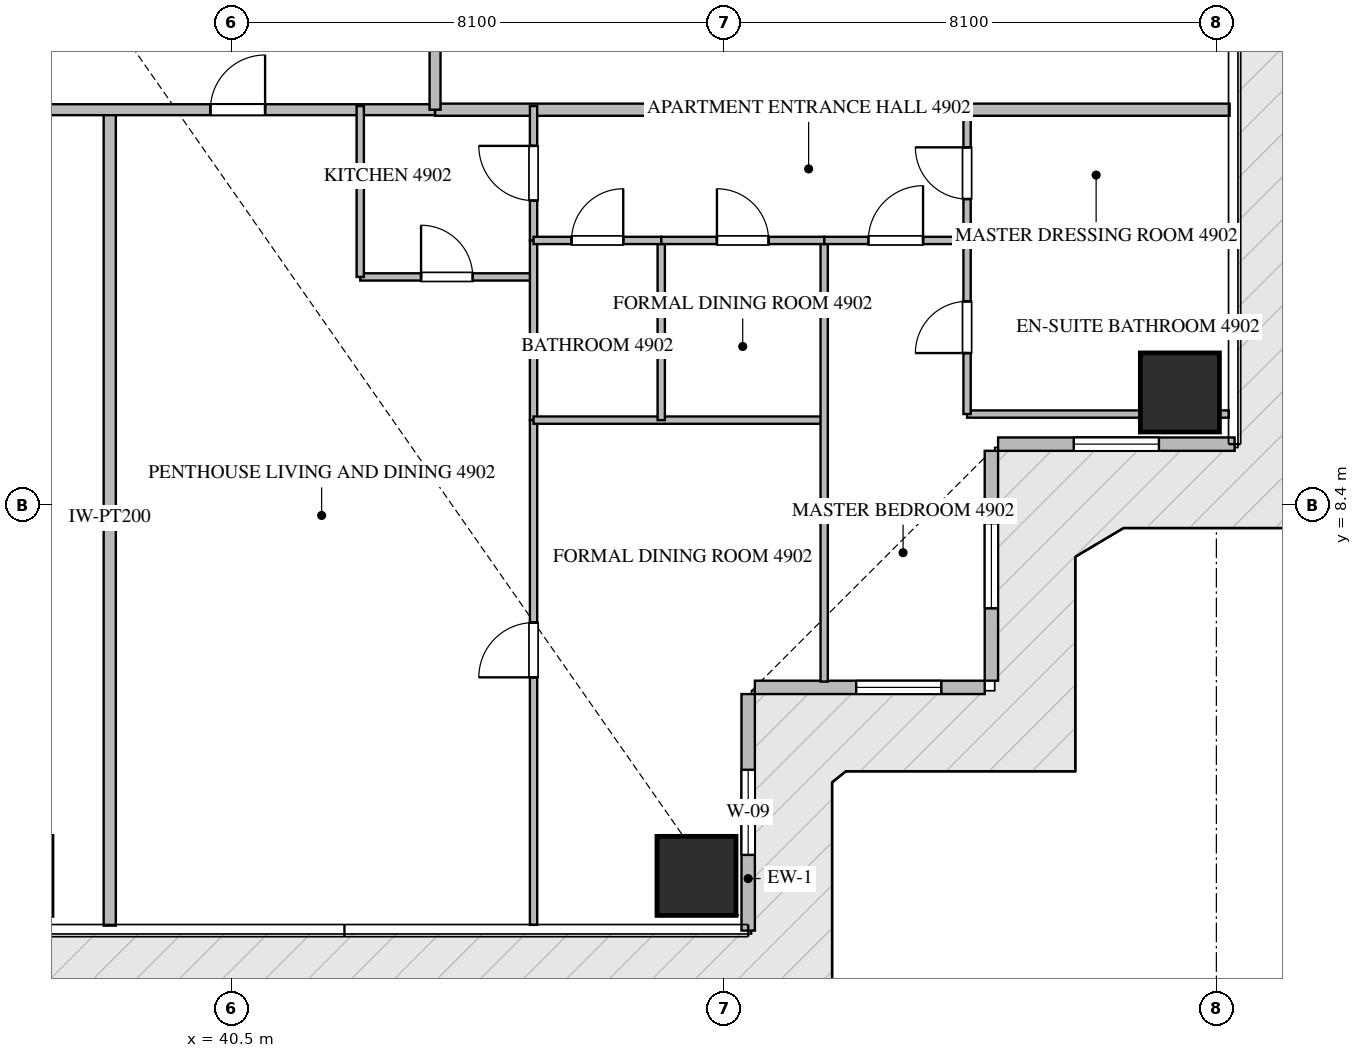
"""IFC4 building model, lengths in metres.
Left out: names, types, materials, properties, quantities, classifications, styles, units other than length and angle.
Written with IfcOpenShell. Run it as: python <this file> out.ifc"""

import sys

from ifc_helpers import new_model, si_unit, direction, frame, frame_2d, origin, origin_2d, place, context, subcontext, project, spatial, rectangle, extrude, source, transform, mapped, element, fill, save


model = new_model("IFC4")
c1 = context("Model", 3, precision=1e-05, world=origin(), true_north=direction((0.0, 1.0)))
c2 = subcontext(c1, "Body", "Model", "MODEL_VIEW")
j1 = project(units=[si_unit("LENGTHUNIT", "METRE"), si_unit("PLANEANGLEUNIT", "RADIAN")], contexts=[c1])
p1 = place(None, origin())
s1 = spatial("IfcSite", under=j1, at=p1, CompositionType="ELEMENT")
p2 = place(p1, origin())
s2 = spatial("IfcBuilding", under=s1, at=p2, CompositionType="ELEMENT")
p3 = place(p2, frame((0.0, 0.0, 195.15)))
s3 = spatial("IfcBuildingStorey", under=s2, at=p3, CompositionType="ELEMENT", Elevation=195.15)
m1 = source(origin(), c2, "Body", "SweptSolid", [
    extrude(rectangle(XDim=1.3, YDim=1.3, at=origin_2d()), origin(), (0.0, 0.0, 1.0), 3.57),
])
for number, where, z_axis, x_axis in (
    (1, (48.15, 2.3, -0.26), (0.0, 0.0, 1.0), (1.0, 0.0, 0.0)),
    (2, (56.1, 10.25, -0.26), (0.0, 0.0, 1.0), (1.0, 0.0, 0.0)),
):
    element("IfcColumn", number, at=place(p3, frame(where, z_axis=z_axis, x_axis=x_axis)), inside=s3, PredefinedType="COLUMN", context=c2, shape_type="MappedRepresentation", body=[
        mapped(m1, transform((0.0, 0.0, 0.0), scale=1.0)),
    ])
p4 = place(p3, frame((49.0, 1.4, 0.0), z_axis=(0.0, 0.0, 1.0), x_axis=(0.0, 1.0, 0.0)))
e3 = element("IfcWall", 3, at=p4, inside=s3, PredefinedType="ELEMENTEDWALL", context=c2, shape_type="SweptSolid", body=[
    extrude(rectangle(XDim=3.89, YDim=0.22, at=frame_2d((1.945, 0.0))), origin(), (0.0, 0.0, 1.0), 3.295),
])
p5 = place(p4, frame((1.245, 0.0, 0.65)))
e4 = element("IfcOpeningElement", 4, at=p5, cuts=e3, PredefinedType="OPENING", context=c2, shape_type="SweptSolid", body=[
    extrude(rectangle(XDim=1.4, YDim=1.35, at=frame_2d((0.7, 0.675))), frame((0.0, 0.12, 0.0), z_axis=(0.0, -1.0, 0.0), x_axis=(1.0, 0.0, 0.0)), (0.0, 0.0, 1.0), 0.24),
])
p6 = place(p3, frame((49.11, 5.4, 0.0), z_axis=(0.0, 0.0, 1.0), x_axis=(1.0, 0.0, 0.0)))
e5 = element("IfcWall", 5, at=p6, inside=s3, PredefinedType="ELEMENTEDWALL", context=c2, shape_type="SweptSolid", body=[
    extrude(rectangle(XDim=3.78, YDim=0.22, at=frame_2d((1.89, 0.0))), origin(), (0.0, 0.0, 1.0), 3.295),
])
p7 = place(p6, frame((1.666, 0.0, 0.65)))
e6 = element("IfcOpeningElement", 6, at=p7, cuts=e5, PredefinedType="OPENING", context=c2, shape_type="SweptSolid", body=[
    extrude(rectangle(XDim=1.4, YDim=1.35, at=frame_2d((0.7, 0.675))), frame((0.0, 0.12, 0.0), z_axis=(0.0, -1.0, 0.0), x_axis=(1.0, 0.0, 0.0)), (0.0, 0.0, 1.0), 0.24),
])
p8 = place(p3, frame((53.0, 5.51, 0.0), z_axis=(0.0, 0.0, 1.0), x_axis=(0.0, 1.0, 0.0)))
e7 = element("IfcWall", 7, at=p8, inside=s3, PredefinedType="ELEMENTEDWALL", context=c2, shape_type="SweptSolid", body=[
    extrude(rectangle(XDim=3.78, YDim=0.22, at=frame_2d((1.89, 0.0))), origin(), (0.0, 0.0, 1.0), 3.295),
])
p9 = place(p8, frame((1.19, 0.0, 0.65)))
e8 = element("IfcOpeningElement", 8, at=p9, cuts=e7, PredefinedType="OPENING", context=c2, shape_type="SweptSolid", body=[
    extrude(rectangle(XDim=1.4, YDim=1.35, at=frame_2d((0.7, 0.675))), frame((0.0, 0.12, 0.0), z_axis=(0.0, -1.0, 0.0), x_axis=(1.0, 0.0, 0.0)), (0.0, 0.0, 1.0), 0.24),
])
p10 = place(p3, frame((53.11, 9.4, 0.0), z_axis=(0.0, 0.0, 1.0), x_axis=(1.0, 0.0, 0.0)))
e9 = element("IfcWall", 9, at=p10, inside=s3, PredefinedType="ELEMENTEDWALL", context=c2, shape_type="SweptSolid", body=[
    extrude(rectangle(XDim=3.89, YDim=0.22, at=frame_2d((1.945, 0.0))), origin(), (0.0, 0.0, 1.0), 3.295),
])
p11 = place(p10, frame((1.245, 0.0, 0.65)))
e10 = element("IfcOpeningElement", 10, at=p11, cuts=e9, PredefinedType="OPENING", context=c2, shape_type="SweptSolid", body=[
    extrude(rectangle(XDim=1.4, YDim=1.35, at=frame_2d((0.7, 0.675))), frame((0.0, 0.12, 0.0), z_axis=(0.0, -1.0, 0.0), x_axis=(1.0, 0.0, 0.0)), (0.0, 0.0, 1.0), 0.24),
])
p12 = place(p3, frame((38.5, 1.482, 0.0), z_axis=(0.0, 0.0, 1.0), x_axis=(0.0, 1.0, 0.0)))
e11 = element("IfcWall", 11, at=p12, inside=s3, PredefinedType="PARTITIONING", context=c2, shape_type="SweptSolid", body=[
    extrude(rectangle(XDim=13.418, YDim=0.2, at=frame_2d((6.709, 0.0))), origin(), (0.0, 0.0, 1.0), 3.31),
])
p13 = place(p3, frame((43.85, 14.9, 0.0), z_axis=(0.0, 0.0, 1.0), x_axis=(1.0, 0.0, 0.0)))
e12 = element("IfcWall", 12, at=p13, inside=s3, PredefinedType="PARTITIONING", context=c2, shape_type="SweptSolid", body=[
    extrude(rectangle(XDim=13.068, YDim=0.2, at=frame_2d((6.534, 0.0))), origin(), (0.0, 0.0, 1.0), 3.31),
])
p14 = place(p3, frame((20.952, 14.9, 0.0), z_axis=(0.0, 0.0, 1.0), x_axis=(1.0, 0.0, 0.0)))
e13 = element("IfcWall", 13, at=p14, inside=s3, PredefinedType="PARTITIONING", context=c2, shape_type="SweptSolid", body=[
    extrude(rectangle(XDim=22.896, YDim=0.18, at=frame_2d((11.448, 0.0))), origin(), (0.0, 0.0, 1.0), 2.145),
])
p15 = place(p14, frame((14.231, 0.0, 0.0)))
e14 = element("IfcOpeningElement", 14, at=p15, cuts=e13, PredefinedType="OPENING", context=c2, shape_type="SweptSolid", body=[
    extrude(rectangle(XDim=0.9, YDim=2.1, at=frame_2d((0.45, 1.05))), frame((0.0, 0.1, 0.0), z_axis=(0.0, -1.0, 0.0), x_axis=(1.0, 0.0, 0.0)), (0.0, 0.0, 1.0), 0.2),
])
p16 = place(p14, frame((19.203, 0.0, 0.0)))
e15 = element("IfcOpeningElement", 15, at=p16, cuts=e13, PredefinedType="OPENING", context=c2, shape_type="SweptSolid", body=[
    extrude(rectangle(XDim=0.9, YDim=2.1, at=frame_2d((0.45, 1.05))), frame((0.0, 0.1, 0.0), z_axis=(0.0, -1.0, 0.0), x_axis=(1.0, 0.0, 0.0)), (0.0, 0.0, 1.0), 0.2),
])
p17 = place(p3, frame((43.85, 14.9, 0.0), z_axis=(0.0, 0.0, 1.0), x_axis=(0.0, 1.0, 0.0)))
e16 = element("IfcWall", 16, at=p17, inside=s3, PredefinedType="PARTITIONING", context=c2, shape_type="SweptSolid", body=[
    extrude(rectangle(XDim=18.7, YDim=0.18, at=frame_2d((9.35, 0.0))), origin(), (0.0, 0.0, 1.0), 3.31),
])
p18 = place(p17, frame((1.805, 0.0, 0.0)))
e17 = element("IfcOpeningElement", 17, at=p18, cuts=e16, PredefinedType="OPENING", context=c2, shape_type="SweptSolid", body=[
    extrude(rectangle(XDim=1.0, YDim=2.15, at=frame_2d((0.5, 1.075))), frame((0.0, 0.1, 0.0), z_axis=(0.0, -1.0, 0.0), x_axis=(1.0, 0.0, 0.0)), (0.0, 0.0, 1.0), 0.2),
])
p19 = place(p3, frame((42.62, 12.15, 0.0), z_axis=(0.0, 0.0, 1.0), x_axis=(1.0, 0.0, 0.0)))
e18 = element("IfcWall", 18, at=p19, inside=s3, PredefinedType="PARTITIONING", context=c2, shape_type="SweptSolid", body=[
    extrude(rectangle(XDim=2.85, YDim=0.12, at=frame_2d((1.425, 0.0))), origin(), (0.0, 0.0, 1.0), 3.31),
])
p20 = place(p19, frame((1.0, 0.0, 0.0)))
e19 = element("IfcOpeningElement", 19, at=p20, cuts=e18, PredefinedType="OPENING", context=c2, shape_type="SweptSolid", body=[
    extrude(rectangle(XDim=0.85, YDim=2.1, at=frame_2d((0.425, 1.05))), frame((0.0, 0.07, 0.0), z_axis=(0.0, -1.0, 0.0), x_axis=(1.0, 0.0, 0.0)), (0.0, 0.0, 1.0), 0.14),
])
p21 = place(p3, frame((42.62, 12.15, 0.0), z_axis=(0.0, 0.0, 1.0), x_axis=(0.0, 1.0, 0.0)))
e20 = element("IfcWall", 20, at=p21, inside=s3, PredefinedType="PARTITIONING", context=c2, shape_type="SweptSolid", body=[
    extrude(rectangle(XDim=2.81, YDim=0.12, at=frame_2d((1.405, 0.0))), origin(), (0.0, 0.0, 1.0), 3.31),
])
p22 = place(p3, frame((45.47, 12.75, 0.0), z_axis=(0.0, 0.0, 1.0), x_axis=(0.0, 1.0, 0.0)))
e21 = element("IfcWall", 21, at=p22, inside=s3, PredefinedType="PARTITIONING", context=c2, shape_type="SweptSolid", body=[
    extrude(rectangle(XDim=2.21, YDim=0.12, at=frame_2d((1.105, 0.0))), origin(), (0.0, 0.0, 1.0), 3.31),
])
p23 = place(p22, frame((0.655, 0.0, 0.0)))
e22 = element("IfcOpeningElement", 22, at=p23, cuts=e21, PredefinedType="OPENING", context=c2, shape_type="SweptSolid", body=[
    extrude(rectangle(XDim=0.9, YDim=2.1, at=frame_2d((0.45, 1.05))), frame((0.0, 0.07, 0.0), z_axis=(0.0, -1.0, 0.0), x_axis=(1.0, 0.0, 0.0)), (0.0, 0.0, 1.0), 0.14),
])
p24 = place(p3, frame((45.47, 1.495, 0.0), z_axis=(0.0, 0.0, 1.0), x_axis=(0.0, 1.0, 0.0)))
e23 = element("IfcWall", 23, at=p24, inside=s3, PredefinedType="PARTITIONING", context=c2, shape_type="SweptSolid", body=[
    extrude(rectangle(XDim=8.3, YDim=0.12, at=frame_2d((4.15, 0.0))), origin(), (0.0, 0.0, 1.0), 3.31),
])
p25 = place(p24, frame((4.07, 0.0, 0.0)))
e24 = element("IfcOpeningElement", 24, at=p25, cuts=e23, PredefinedType="OPENING", context=c2, shape_type="SweptSolid", body=[
    extrude(rectangle(XDim=0.9, YDim=2.1, at=frame_2d((0.45, 1.05))), frame((0.0, 0.07, 0.0), z_axis=(0.0, -1.0, 0.0), x_axis=(1.0, 0.0, 0.0)), (0.0, 0.0, 1.0), 0.14),
])
p26 = place(p3, frame((45.47, 9.797, 0.0), z_axis=(0.0, 0.0, 1.0), x_axis=(0.0, 1.0, 0.0)))
e25 = element("IfcWall", 25, at=p26, inside=s3, PredefinedType="PARTITIONING", context=c2, shape_type="SweptSolid", body=[
    extrude(rectangle(XDim=2.951, YDim=0.12, at=frame_2d((1.476, 0.0))), origin(), (0.0, 0.0, 1.0), 3.31),
])
p27 = place(p3, frame((45.47, 9.795, 0.0), z_axis=(0.0, 0.0, 1.0), x_axis=(1.0, 0.0, 0.0)))
e26 = element("IfcWall", 26, at=p27, inside=s3, PredefinedType="PARTITIONING", context=c2, shape_type="SweptSolid", body=[
    extrude(rectangle(XDim=4.78, YDim=0.12, at=frame_2d((2.39, 0.0))), origin(), (0.0, 0.0, 1.0), 2.145),
])
p28 = place(p3, frame((50.25, 5.495, 0.0), z_axis=(0.0, 0.0, 1.0), x_axis=(0.0, 1.0, 0.0)))
e27 = element("IfcWall", 27, at=p28, inside=s3, PredefinedType="PARTITIONING", context=c2, shape_type="SweptSolid", body=[
    extrude(rectangle(XDim=7.255, YDim=0.12, at=frame_2d((3.627, 0.0))), origin(), (0.0, 0.0, 1.0), 3.31),
])
p29 = place(p3, frame((47.57, 9.795, 0.0), z_axis=(0.0, 0.0, 1.0), x_axis=(0.0, 1.0, 0.0)))
e28 = element("IfcWall", 28, at=p29, inside=s3, PredefinedType="PARTITIONING", context=c2, shape_type="SweptSolid", body=[
    extrude(rectangle(XDim=2.955, YDim=0.12, at=frame_2d((1.478, 0.0))), origin(), (0.0, 0.0, 1.0), 2.145),
])
p30 = place(p3, frame((45.47, 12.75, 0.0), z_axis=(0.0, 0.0, 1.0), x_axis=(1.0, 0.0, 0.0)))
e29 = element("IfcWall", 29, at=p30, inside=s3, PredefinedType="PARTITIONING", context=c2, shape_type="SweptSolid", body=[
    extrude(rectangle(XDim=2.1, YDim=0.12, at=frame_2d((1.05, 0.0))), origin(), (0.0, 0.0, 1.0), 2.145),
])
p31 = place(p30, frame((0.625, 0.0, 0.0)))
e30 = element("IfcOpeningElement", 30, at=p31, cuts=e29, PredefinedType="OPENING", context=c2, shape_type="SweptSolid", body=[
    extrude(rectangle(XDim=0.85, YDim=2.1, at=frame_2d((0.425, 1.05))), frame((0.0, 0.07, 0.0), z_axis=(0.0, -1.0, 0.0), x_axis=(1.0, 0.0, 0.0)), (0.0, 0.0, 1.0), 0.14),
])
p32 = place(p3, frame((47.572, 12.75, 0.0), z_axis=(0.0, 0.0, 1.0), x_axis=(1.0, 0.0, 0.0)))
e31 = element("IfcWall", 31, at=p32, inside=s3, PredefinedType="PARTITIONING", context=c2, shape_type="SweptSolid", body=[
    extrude(rectangle(XDim=2.678, YDim=0.12, at=frame_2d((1.339, 0.0))), origin(), (0.0, 0.0, 1.0), 2.145),
])
p33 = place(p32, frame((0.914, 0.0, 0.0)))
e32 = element("IfcOpeningElement", 32, at=p33, cuts=e31, PredefinedType="OPENING", context=c2, shape_type="SweptSolid", body=[
    extrude(rectangle(XDim=0.85, YDim=2.1, at=frame_2d((0.425, 1.05))), frame((0.0, 0.07, 0.0), z_axis=(0.0, -1.0, 0.0), x_axis=(1.0, 0.0, 0.0)), (0.0, 0.0, 1.0), 0.14),
])
p34 = place(p3, frame((50.252, 12.75, 0.0), z_axis=(0.0, 0.0, 1.0), x_axis=(1.0, 0.0, 0.0)))
e33 = element("IfcWall", 33, at=p34, inside=s3, PredefinedType="PARTITIONING", context=c2, shape_type="SweptSolid", body=[
    extrude(rectangle(XDim=2.348, YDim=0.12, at=frame_2d((1.174, 0.0))), origin(), (0.0, 0.0, 1.0), 3.31),
])
p35 = place(p34, frame((0.724, 0.0, 0.0)))
e34 = element("IfcOpeningElement", 34, at=p35, cuts=e33, PredefinedType="OPENING", context=c2, shape_type="SweptSolid", body=[
    extrude(rectangle(XDim=0.9, YDim=2.1, at=frame_2d((0.45, 1.05))), frame((0.0, 0.07, 0.0), z_axis=(0.0, -1.0, 0.0), x_axis=(1.0, 0.0, 0.0)), (0.0, 0.0, 1.0), 0.14),
])
p36 = place(p3, frame((52.6, 9.895, 0.0), z_axis=(0.0, 0.0, 1.0), x_axis=(1.0, 0.0, 0.0)))
e35 = element("IfcWall", 35, at=p36, inside=s3, PredefinedType="PARTITIONING", context=c2, shape_type="SweptSolid", body=[
    extrude(rectangle(XDim=4.305, YDim=0.12, at=frame_2d((2.152, 0.0))), origin(), (0.0, 0.0, 1.0), 2.145),
])
p37 = place(p3, frame((52.602, 12.75, 0.0), z_axis=(0.0, 0.0, 1.0), x_axis=(1.0, 0.0, 0.0)))
e36 = element("IfcWall", 36, at=p37, inside=s3, PredefinedType="PARTITIONING", context=c2, shape_type="SweptSolid", body=[
    extrude(rectangle(XDim=4.303, YDim=0.12, at=frame_2d((2.151, 0.0))), origin(), (0.0, 0.0, 1.0), 3.31),
])
p38 = place(p3, frame((52.6, 9.895, 0.0), z_axis=(0.0, 0.0, 1.0), x_axis=(0.0, 1.0, 0.0)))
e37 = element("IfcWall", 37, at=p38, inside=s3, PredefinedType="PARTITIONING", context=c2, shape_type="SweptSolid", body=[
    extrude(rectangle(XDim=2.855, YDim=0.12, at=frame_2d((1.427, 0.0))), origin(), (0.0, 0.0, 1.0), 3.31),
])
p39 = place(p38, frame((1.003, 0.0, 0.0)))
e38 = element("IfcOpeningElement", 38, at=p39, cuts=e37, PredefinedType="OPENING", context=c2, shape_type="SweptSolid", body=[
    extrude(rectangle(XDim=0.85, YDim=2.1, at=frame_2d((0.425, 1.05))), frame((0.0, 0.07, 0.0), z_axis=(0.0, -1.0, 0.0), x_axis=(1.0, 0.0, 0.0)), (0.0, 0.0, 1.0), 0.14),
])
p40 = place(p3, frame((52.6, 12.752, 0.0), z_axis=(0.0, 0.0, 1.0), x_axis=(0.0, 1.0, 0.0)))
e39 = element("IfcWall", 39, at=p40, inside=s3, PredefinedType="PARTITIONING", context=c2, shape_type="SweptSolid", body=[
    extrude(rectangle(XDim=2.208, YDim=0.12, at=frame_2d((1.104, 0.0))), origin(), (0.0, 0.0, 1.0), 3.31),
])
p41 = place(p40, frame((0.679, 0.0, 0.0)))
e40 = element("IfcOpeningElement", 40, at=p41, cuts=e39, PredefinedType="OPENING", context=c2, shape_type="SweptSolid", body=[
    extrude(rectangle(XDim=0.85, YDim=2.1, at=frame_2d((0.425, 1.05))), frame((0.0, 0.07, 0.0), z_axis=(0.0, -1.0, 0.0), x_axis=(1.0, 0.0, 0.0)), (0.0, 0.0, 1.0), 0.14),
])
m2 = source(origin(), c2, "Body", "SweptSolid", [
    extrude(rectangle(XDim=1.4, YDim=1.35, at=frame_2d((0.7, 0.675))), frame((0.0, 0.03, 0.0), z_axis=(0.0, -1.0, 0.0), x_axis=(1.0, 0.0, 0.0)), (0.0, 0.0, 1.0), 0.06),
])
p42 = place(p5, origin())
e41 = element("IfcWindow", 41, at=p42, inside=s3, PartitioningType="SINGLE_PANEL", PredefinedType="WINDOW", context=c2, shape_type="MappedRepresentation", body=[
    mapped(m2, transform((0.0, 0.0, 0.0), scale=1.0)),
])
fill(e4, e41)
p43 = place(p7, origin())
e42 = element("IfcWindow", 42, at=p43, inside=s3, PartitioningType="SINGLE_PANEL", PredefinedType="WINDOW", context=c2, shape_type="MappedRepresentation", body=[
    mapped(m2, transform((0.0, 0.0, 0.0), scale=1.0)),
])
fill(e6, e42)
p44 = place(p9, origin())
e43 = element("IfcWindow", 43, at=p44, inside=s3, PartitioningType="SINGLE_PANEL", PredefinedType="WINDOW", context=c2, shape_type="MappedRepresentation", body=[
    mapped(m2, transform((0.0, 0.0, 0.0), scale=1.0)),
])
fill(e8, e43)
p45 = place(p11, origin())
e44 = element("IfcWindow", 44, at=p45, inside=s3, PartitioningType="SINGLE_PANEL", PredefinedType="WINDOW", context=c2, shape_type="MappedRepresentation", body=[
    mapped(m2, transform((0.0, 0.0, 0.0), scale=1.0)),
])
fill(e10, e44)
m3 = source(origin(), c2, "Body", "SweptSolid", [
    extrude(rectangle(XDim=0.9, YDim=2.1, at=frame_2d((0.45, 1.05))), frame((0.0, 0.025, 0.0), z_axis=(0.0, -1.0, 0.0), x_axis=(1.0, 0.0, 0.0)), (0.0, 0.0, 1.0), 0.05),
])
p46 = place(p16, origin())
e45 = element("IfcDoor", 45, at=p46, inside=s3, OperationType="SINGLE_SWING_RIGHT", PredefinedType="DOOR", context=c2, shape_type="MappedRepresentation", body=[
    mapped(m3, transform((0.0, 0.0, 0.0), scale=1.0)),
])
fill(e15, e45)
m4 = source(origin(), c2, "Body", "SweptSolid", [
    extrude(rectangle(XDim=0.85, YDim=2.1, at=frame_2d((0.425, 1.05))), frame((0.0, 0.025, 0.0), z_axis=(0.0, -1.0, 0.0), x_axis=(1.0, 0.0, 0.0)), (0.0, 0.0, 1.0), 0.05),
])
p47 = place(p20, origin())
e46 = element("IfcDoor", 46, at=p47, inside=s3, OperationType="SINGLE_SWING_LEFT", PredefinedType="DOOR", context=c2, shape_type="MappedRepresentation", body=[
    mapped(m4, transform((0.0, 0.0, 0.0), scale=1.0)),
])
fill(e19, e46)
p48 = place(p23, origin())
e47 = element("IfcDoor", 47, at=p48, inside=s3, OperationType="SINGLE_SWING_RIGHT", PredefinedType="DOOR", context=c2, shape_type="MappedRepresentation", body=[
    mapped(m3, transform((0.0, 0.0, 0.0), scale=1.0)),
])
fill(e22, e47)
p49 = place(p25, origin())
e48 = element("IfcDoor", 48, at=p49, inside=s3, OperationType="SINGLE_SWING_LEFT", PredefinedType="DOOR", context=c2, shape_type="MappedRepresentation", body=[
    mapped(m3, transform((0.0, 0.0, 0.0), scale=1.0)),
])
fill(e24, e48)
p50 = place(p31, origin())
e49 = element("IfcDoor", 49, at=p50, inside=s3, OperationType="SINGLE_SWING_RIGHT", PredefinedType="DOOR", context=c2, shape_type="MappedRepresentation", body=[
    mapped(m4, transform((0.0, 0.0, 0.0), scale=1.0)),
])
fill(e30, e49)
p51 = place(p33, origin())
e50 = element("IfcDoor", 50, at=p51, inside=s3, OperationType="SINGLE_SWING_LEFT", PredefinedType="DOOR", context=c2, shape_type="MappedRepresentation", body=[
    mapped(m4, transform((0.0, 0.0, 0.0), scale=1.0)),
])
fill(e32, e50)
p52 = place(p35, origin())
e51 = element("IfcDoor", 51, at=p52, inside=s3, OperationType="SINGLE_SWING_RIGHT", PredefinedType="DOOR", context=c2, shape_type="MappedRepresentation", body=[
    mapped(m3, transform((0.0, 0.0, 0.0), scale=1.0)),
])
fill(e34, e51)
p53 = place(p39, origin())
e52 = element("IfcDoor", 52, at=p53, inside=s3, OperationType="SINGLE_SWING_LEFT", PredefinedType="DOOR", context=c2, shape_type="MappedRepresentation", body=[
    mapped(m4, transform((0.0, 0.0, 0.0), scale=1.0)),
])
fill(e38, e52)
p54 = place(p41, origin())
e53 = element("IfcDoor", 53, at=p54, inside=s3, OperationType="SINGLE_SWING_RIGHT", PredefinedType="DOOR", context=c2, shape_type="MappedRepresentation", body=[
    mapped(m4, transform((0.0, 0.0, 0.0), scale=1.0)),
])
fill(e40, e53)
save(model, sys.argv[1])
